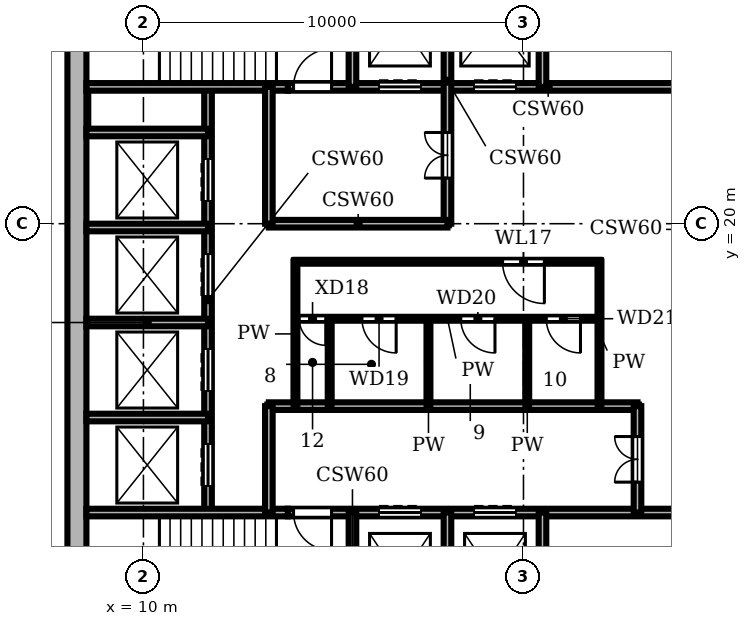
"""IFC4 building model, lengths in metres.
Left out: names, types, materials, properties, quantities, classifications, styles, units other than length and angle.
Written with IfcOpenShell. Run it as: python <this file> out.ifc"""

import sys

from ifc_helpers import new_model, si_unit, direction, frame, frame_2d, origin, place, context, subcontext, project, spatial, rectangle, extrude, element, fill, save


model = new_model("IFC4")
c1 = context("Model", 3, precision=1e-05, world=origin(), true_north=direction((0.0, 1.0)))
c2 = subcontext(c1, "Body", "Model", "MODEL_VIEW")
j1 = project(units=[si_unit("LENGTHUNIT", "METRE"), si_unit("PLANEANGLEUNIT", "RADIAN")], contexts=[c1])
p1 = place(None, origin())
s1 = spatial("IfcSite", under=j1, at=p1, CompositionType="ELEMENT")
p2 = place(p1, origin())
s2 = spatial("IfcBuilding", under=s1, at=p2, CompositionType="ELEMENT")
p3 = place(p2, frame((0.0, 0.0, 263.1)))
s3 = spatial("IfcBuildingStorey", under=s2, at=p3, CompositionType="ELEMENT", Elevation=263.1)
p4 = place(p3, frame((8.25, 27.5, 0.0), z_axis=(0.0, 0.0, 1.0), x_axis=(0.0, -1.0, 0.0)))
e1 = element("IfcWall", 1, at=p4, inside=s3, PredefinedType="SHEAR", context=c2, shape_type="SweptSolid", body=[
    extrude(rectangle(XDim=19.0, YDim=0.5, at=frame_2d((9.5, 0.0))), origin(), (0.0, 0.0, 1.0), 3.9),
])
p5 = place(p3, frame((8.5, 12.4, 0.0), z_axis=(0.0, 0.0, 1.0), x_axis=(1.0, 0.0, 0.0)))
e2 = element("IfcWall", 2, at=p5, inside=s3, PredefinedType="SHEAR", context=c2, shape_type="SweptSolid", body=[
    extrude(rectangle(XDim=5.3, YDim=0.2, at=frame_2d((2.65, 0.0))), origin(), (0.0, 0.0, 1.0), 3.58),
])
p6 = place(p3, frame((13.8, 12.4, 0.0), z_axis=(0.0, 0.0, 1.0), x_axis=(1.0, 0.0, 0.0)))
e3 = element("IfcWall", 3, at=p6, inside=s3, PredefinedType="SHEAR", context=c2, shape_type="SweptSolid", body=[
    extrude(rectangle(XDim=13.7, YDim=0.2, at=frame_2d((6.85, 0.0))), origin(), (0.0, 0.0, 1.0), 3.58),
])
p7 = place(p6, frame((2.4, 0.0, 0.0)))
e4 = element("IfcOpeningElement", 4, at=p7, cuts=e3, PredefinedType="OPENING", context=c2, shape_type="SweptSolid", body=[
    extrude(rectangle(XDim=1.1, YDim=2.1, at=frame_2d((0.55, 1.05))), frame((0.0, 0.11, 0.0), z_axis=(0.0, -1.0, 0.0), x_axis=(1.0, 0.0, 0.0)), (0.0, 0.0, 1.0), 0.22),
])
p8 = place(p6, frame((4.9, 0.0, 0.0)))
e5 = element("IfcOpeningElement", 5, at=p8, cuts=e3, PredefinedType="OPENING", context=c2, shape_type="SweptSolid", body=[
    extrude(rectangle(XDim=1.1, YDim=2.1, at=frame_2d((0.55, 1.05))), frame((0.0, 0.11, 0.0), z_axis=(0.0, -1.0, 0.0), x_axis=(1.0, 0.0, 0.0)), (0.0, 0.0, 1.0), 0.22),
])
p9 = place(p6, frame((0.15, 0.0, 0.0)))
e6 = element("IfcOpeningElement", 6, at=p9, cuts=e3, PredefinedType="OPENING", context=c2, shape_type="SweptSolid", body=[
    extrude(rectangle(XDim=1.0, YDim=2.1, at=frame_2d((0.5, 1.05))), frame((0.0, 0.11, 0.0), z_axis=(0.0, -1.0, 0.0), x_axis=(1.0, 0.0, 0.0)), (0.0, 0.0, 1.0), 0.22),
])
p10 = place(p3, frame((8.5, 14.9, 0.0), z_axis=(0.0, 0.0, 1.0), x_axis=(1.0, 0.0, 0.0)))
e7 = element("IfcWall", 7, at=p10, inside=s3, PredefinedType="SHEAR", context=c2, shape_type="SweptSolid", body=[
    extrude(rectangle(XDim=3.2, YDim=0.2, at=frame_2d((1.6, 0.0))), origin(), (0.0, 0.0, 1.0), 3.58),
])
p11 = place(p3, frame((13.3, 15.2, 0.0), z_axis=(0.0, 0.0, 1.0), x_axis=(1.0, 0.0, 0.0)))
e8 = element("IfcWall", 8, at=p11, inside=s3, PredefinedType="SHEAR", context=c2, shape_type="SweptSolid", body=[
    extrude(rectangle(XDim=9.7, YDim=0.2, at=frame_2d((4.85, 0.0))), origin(), (0.0, 0.0, 1.0), 3.58),
])
p12 = place(p3, frame((8.5, 17.4, 0.0), z_axis=(0.0, 0.0, 1.0), x_axis=(1.0, 0.0, 0.0)))
e9 = element("IfcWall", 9, at=p12, inside=s3, PredefinedType="SHEAR", context=c2, shape_type="SweptSolid", body=[
    extrude(rectangle(XDim=3.2, YDim=0.2, at=frame_2d((1.6, 0.0))), origin(), (0.0, 0.0, 1.0), 3.58),
])
p13 = place(p3, frame((14.0, 17.5, 0.0), z_axis=(0.0, 0.0, 1.0), x_axis=(1.0, 0.0, 0.0)))
e10 = element("IfcWall", 10, at=p13, inside=s3, PredefinedType="PARTITIONING", context=c2, shape_type="SweptSolid", body=[
    extrude(rectangle(XDim=8.0, YDim=0.1, at=frame_2d((4.0, 0.0))), origin(), (0.0, 0.0, 1.0), 3.58),
])
p14 = place(p13, frame((0.1, 0.0, 0.0)))
e11 = element("IfcOpeningElement", 11, at=p14, cuts=e10, PredefinedType="OPENING", context=c2, shape_type="SweptSolid", body=[
    extrude(rectangle(XDim=0.7, YDim=2.1, at=frame_2d((0.35, 1.05))), frame((0.0, 0.06, 0.0), z_axis=(0.0, -1.0, 0.0), x_axis=(1.0, 0.0, 0.0)), (0.0, 0.0, 1.0), 0.12),
])
p15 = place(p13, frame((1.75, 0.0, 0.0)))
e12 = element("IfcOpeningElement", 12, at=p15, cuts=e10, PredefinedType="OPENING", context=c2, shape_type="SweptSolid", body=[
    extrude(rectangle(XDim=0.9, YDim=2.1, at=frame_2d((0.45, 1.05))), frame((0.0, 0.06, 0.0), z_axis=(0.0, -1.0, 0.0), x_axis=(1.0, 0.0, 0.0)), (0.0, 0.0, 1.0), 0.12),
])
p16 = place(p13, frame((4.35, 0.0, 0.0)))
e13 = element("IfcOpeningElement", 13, at=p16, cuts=e10, PredefinedType="OPENING", context=c2, shape_type="SweptSolid", body=[
    extrude(rectangle(XDim=0.9, YDim=2.1, at=frame_2d((0.45, 1.05))), frame((0.0, 0.06, 0.0), z_axis=(0.0, -1.0, 0.0), x_axis=(1.0, 0.0, 0.0)), (0.0, 0.0, 1.0), 0.12),
])
p17 = place(p13, frame((6.6, 0.0, 0.0)))
e14 = element("IfcOpeningElement", 14, at=p17, cuts=e10, PredefinedType="OPENING", context=c2, shape_type="SweptSolid", body=[
    extrude(rectangle(XDim=0.9, YDim=2.1, at=frame_2d((0.45, 1.05))), frame((0.0, 0.06, 0.0), z_axis=(0.0, -1.0, 0.0), x_axis=(1.0, 0.0, 0.0)), (0.0, 0.0, 1.0), 0.12),
])
p18 = place(p3, frame((14.0, 19.0, 0.0), z_axis=(0.0, 0.0, 1.0), x_axis=(1.0, 0.0, 0.0)))
e15 = element("IfcWall", 15, at=p18, inside=s3, PredefinedType="PARTITIONING", context=c2, shape_type="SweptSolid", body=[
    extrude(rectangle(XDim=8.0, YDim=0.1, at=frame_2d((4.0, 0.0))), origin(), (0.0, 0.0, 1.0), 3.58),
])
p19 = place(p18, frame((5.45, 0.0, 0.0)))
e16 = element("IfcOpeningElement", 16, at=p19, cuts=e15, PredefinedType="OPENING", context=c2, shape_type="SweptSolid", body=[
    extrude(rectangle(XDim=1.1, YDim=2.1, at=frame_2d((0.55, 1.05))), frame((0.0, 0.06, 0.0), z_axis=(0.0, -1.0, 0.0), x_axis=(1.0, 0.0, 0.0)), (0.0, 0.0, 1.0), 0.12),
])
p20 = place(p3, frame((8.5, 19.9, 0.0), z_axis=(0.0, 0.0, 1.0), x_axis=(1.0, 0.0, 0.0)))
e17 = element("IfcWall", 17, at=p20, inside=s3, PredefinedType="SHEAR", context=c2, shape_type="SweptSolid", body=[
    extrude(rectangle(XDim=3.2, YDim=0.2, at=frame_2d((1.6, 0.0))), origin(), (0.0, 0.0, 1.0), 3.58),
])
p21 = place(p3, frame((13.3, 20.0, 0.0), z_axis=(0.0, 0.0, 1.0), x_axis=(1.0, 0.0, 0.0)))
e18 = element("IfcWall", 18, at=p21, inside=s3, PredefinedType="SHEAR", context=c2, shape_type="SweptSolid", body=[
    extrude(rectangle(XDim=4.7, YDim=0.2, at=frame_2d((2.35, 0.0))), origin(), (0.0, 0.0, 1.0), 3.58),
])
p22 = place(p3, frame((8.5, 22.4, 0.0), z_axis=(0.0, 0.0, 1.0), x_axis=(1.0, 0.0, 0.0)))
e19 = element("IfcWall", 19, at=p22, inside=s3, PredefinedType="SHEAR", context=c2, shape_type="SweptSolid", body=[
    extrude(rectangle(XDim=3.2, YDim=0.2, at=frame_2d((1.6, 0.0))), origin(), (0.0, 0.0, 1.0), 3.58),
])
p23 = place(p3, frame((8.5, 23.6, 0.0), z_axis=(0.0, 0.0, 1.0), x_axis=(1.0, 0.0, 0.0)))
e20 = element("IfcWall", 20, at=p23, inside=s3, PredefinedType="SHEAR", context=c2, shape_type="SweptSolid", body=[
    extrude(rectangle(XDim=5.3, YDim=0.2, at=frame_2d((2.65, 0.0))), origin(), (0.0, 0.0, 1.0), 3.58),
])
p24 = place(p3, frame((13.8, 23.6, 0.0), z_axis=(0.0, 0.0, 1.0), x_axis=(1.0, 0.0, 0.0)))
e21 = element("IfcWall", 21, at=p24, inside=s3, PredefinedType="SHEAR", context=c2, shape_type="SweptSolid", body=[
    extrude(rectangle(XDim=13.7, YDim=0.2, at=frame_2d((6.85, 0.0))), origin(), (0.0, 0.0, 1.0), 3.58),
])
p25 = place(p24, frame((2.4, 0.0, 0.0)))
e22 = element("IfcOpeningElement", 22, at=p25, cuts=e21, PredefinedType="OPENING", context=c2, shape_type="SweptSolid", body=[
    extrude(rectangle(XDim=1.1, YDim=2.1, at=frame_2d((0.55, 1.05))), frame((0.0, 0.11, 0.0), z_axis=(0.0, -1.0, 0.0), x_axis=(1.0, 0.0, 0.0)), (0.0, 0.0, 1.0), 0.22),
])
p26 = place(p24, frame((4.9, 0.0, 0.0)))
e23 = element("IfcOpeningElement", 23, at=p26, cuts=e21, PredefinedType="OPENING", context=c2, shape_type="SweptSolid", body=[
    extrude(rectangle(XDim=1.1, YDim=2.1, at=frame_2d((0.55, 1.05))), frame((0.0, 0.11, 0.0), z_axis=(0.0, -1.0, 0.0), x_axis=(1.0, 0.0, 0.0)), (0.0, 0.0, 1.0), 0.22),
])
p27 = place(p24, frame((0.15, 0.0, 0.0)))
e24 = element("IfcOpeningElement", 24, at=p27, cuts=e21, PredefinedType="OPENING", context=c2, shape_type="SweptSolid", body=[
    extrude(rectangle(XDim=1.0, YDim=2.1, at=frame_2d((0.5, 1.05))), frame((0.0, 0.11, 0.0), z_axis=(0.0, -1.0, 0.0), x_axis=(1.0, 0.0, 0.0)), (0.0, 0.0, 1.0), 0.22),
])
p28 = place(p3, frame((11.7, 12.4, 0.0), z_axis=(0.0, 0.0, 1.0), x_axis=(0.0, 1.0, 0.0)))
e25 = element("IfcWall", 25, at=p28, inside=s3, PredefinedType="SHEAR", context=c2, shape_type="SweptSolid", body=[
    extrude(rectangle(XDim=11.2, YDim=0.2, at=frame_2d((5.6, 0.0))), origin(), (0.0, 0.0, 1.0), 3.58),
])
p29 = place(p28, frame((0.7, 0.0, 0.0)))
e26 = element("IfcOpeningElement", 26, at=p29, cuts=e25, PredefinedType="OPENING", context=c2, shape_type="SweptSolid", body=[
    extrude(rectangle(XDim=1.1, YDim=2.1, at=frame_2d((0.55, 1.05))), frame((0.0, 0.11, 0.0), z_axis=(0.0, -1.0, 0.0), x_axis=(1.0, 0.0, 0.0)), (0.0, 0.0, 1.0), 0.22),
])
p30 = place(p28, frame((3.2, 0.0, 0.0)))
e27 = element("IfcOpeningElement", 27, at=p30, cuts=e25, PredefinedType="OPENING", context=c2, shape_type="SweptSolid", body=[
    extrude(rectangle(XDim=1.1, YDim=2.1, at=frame_2d((0.55, 1.05))), frame((0.0, 0.11, 0.0), z_axis=(0.0, -1.0, 0.0), x_axis=(1.0, 0.0, 0.0)), (0.0, 0.0, 1.0), 0.22),
])
p31 = place(p28, frame((5.7, 0.0, 0.0)))
e28 = element("IfcOpeningElement", 28, at=p31, cuts=e25, PredefinedType="OPENING", context=c2, shape_type="SweptSolid", body=[
    extrude(rectangle(XDim=1.1, YDim=2.1, at=frame_2d((0.55, 1.05))), frame((0.0, 0.11, 0.0), z_axis=(0.0, -1.0, 0.0), x_axis=(1.0, 0.0, 0.0)), (0.0, 0.0, 1.0), 0.22),
])
p32 = place(p28, frame((8.2, 0.0, 0.0)))
e29 = element("IfcOpeningElement", 29, at=p32, cuts=e25, PredefinedType="OPENING", context=c2, shape_type="SweptSolid", body=[
    extrude(rectangle(XDim=1.1, YDim=2.1, at=frame_2d((0.55, 1.05))), frame((0.0, 0.11, 0.0), z_axis=(0.0, -1.0, 0.0), x_axis=(1.0, 0.0, 0.0)), (0.0, 0.0, 1.0), 0.22),
])
p33 = place(p3, frame((13.3, 12.4, 0.0), z_axis=(0.0, 0.0, 1.0), x_axis=(0.0, 1.0, 0.0)))
e30 = element("IfcWall", 30, at=p33, inside=s3, PredefinedType="SHEAR", context=c2, shape_type="SweptSolid", body=[
    extrude(rectangle(XDim=2.8, YDim=0.2, at=frame_2d((1.4, 0.0))), origin(), (0.0, 0.0, 1.0), 3.58),
])
p34 = place(p3, frame((13.3, 20.0, 0.0), z_axis=(0.0, 0.0, 1.0), x_axis=(0.0, 1.0, 0.0)))
e31 = element("IfcWall", 31, at=p34, inside=s3, PredefinedType="SHEAR", context=c2, shape_type="SweptSolid", body=[
    extrude(rectangle(XDim=3.6, YDim=0.2, at=frame_2d((1.8, 0.0))), origin(), (0.0, 0.0, 1.0), 3.58),
])
p35 = place(p3, frame((14.0, 15.2, 0.0), z_axis=(0.0, 0.0, 1.0), x_axis=(0.0, 1.0, 0.0)))
e32 = element("IfcWall", 32, at=p35, inside=s3, PredefinedType="PARTITIONING", context=c2, shape_type="SweptSolid", body=[
    extrude(rectangle(XDim=3.8, YDim=0.1, at=frame_2d((1.9, 0.0))), origin(), (0.0, 0.0, 1.0), 3.58),
])
p36 = place(p3, frame((14.9, 15.2, 0.0), z_axis=(0.0, 0.0, 1.0), x_axis=(0.0, 1.0, 0.0)))
e33 = element("IfcWall", 33, at=p36, inside=s3, PredefinedType="PARTITIONING", context=c2, shape_type="SweptSolid", body=[
    extrude(rectangle(XDim=2.3, YDim=0.1, at=frame_2d((1.15, 0.0))), origin(), (0.0, 0.0, 1.0), 3.58),
])
for number, where, z_axis, x_axis in (
    (34, (15.5, 8.5, 0.0), (0.0, 0.0, 1.0), (0.0, 1.0, 0.0)),
    (35, (15.5, 23.6, 0.0), (0.0, 0.0, 1.0), (0.0, 1.0, 0.0)),
):
    element("IfcWall", number, at=place(p3, frame(where, z_axis=z_axis, x_axis=x_axis)), inside=s3, PredefinedType="SHEAR", context=c2, shape_type="SweptSolid", body=[
        extrude(rectangle(XDim=3.9, YDim=0.2, at=frame_2d((1.95, 0.0))), origin(), (0.0, 0.0, 1.0), 3.58),
    ])
p37 = place(p3, frame((17.5, 15.2, 0.0), z_axis=(0.0, 0.0, 1.0), x_axis=(0.0, 1.0, 0.0)))
e36 = element("IfcWall", 36, at=p37, inside=s3, PredefinedType="PARTITIONING", context=c2, shape_type="SweptSolid", body=[
    extrude(rectangle(XDim=2.3, YDim=0.1, at=frame_2d((1.15, 0.0))), origin(), (0.0, 0.0, 1.0), 3.58),
])
p38 = place(p3, frame((18.0, 8.5, 0.0), z_axis=(0.0, 0.0, 1.0), x_axis=(0.0, 1.0, 0.0)))
e37 = element("IfcWall", 37, at=p38, inside=s3, PredefinedType="SHEAR", context=c2, shape_type="SweptSolid", body=[
    extrude(rectangle(XDim=3.9, YDim=0.2, at=frame_2d((1.95, 0.0))), origin(), (0.0, 0.0, 1.0), 3.58),
])
p39 = place(p3, frame((18.0, 20.0, 0.0), z_axis=(0.0, 0.0, 1.0), x_axis=(0.0, 1.0, 0.0)))
e38 = element("IfcWall", 38, at=p39, inside=s3, PredefinedType="SHEAR", context=c2, shape_type="SweptSolid", body=[
    extrude(rectangle(XDim=7.5, YDim=0.2, at=frame_2d((3.75, 0.0))), origin(), (0.0, 0.0, 1.0), 3.58),
])
p40 = place(p39, frame((1.2, 0.0, 0.0)))
e39 = element("IfcOpeningElement", 39, at=p40, cuts=e38, PredefinedType="OPENING", context=c2, shape_type="SweptSolid", body=[
    extrude(rectangle(XDim=1.2, YDim=2.1, at=frame_2d((0.6, 1.05))), frame((0.0, 0.11, 0.0), z_axis=(0.0, -1.0, 0.0), x_axis=(1.0, 0.0, 0.0)), (0.0, 0.0, 1.0), 0.22),
])
p41 = place(p3, frame((20.1, 15.2, 0.0), z_axis=(0.0, 0.0, 1.0), x_axis=(0.0, 1.0, 0.0)))
e40 = element("IfcWall", 40, at=p41, inside=s3, PredefinedType="PARTITIONING", context=c2, shape_type="SweptSolid", body=[
    extrude(rectangle(XDim=2.3, YDim=0.1, at=frame_2d((1.15, 0.0))), origin(), (0.0, 0.0, 1.0), 3.58),
])
for number, where, z_axis, x_axis in (
    (41, (20.5, 8.5, 0.0), (0.0, 0.0, 1.0), (0.0, 1.0, 0.0)),
    (42, (20.5, 23.6, 0.0), (0.0, 0.0, 1.0), (0.0, 1.0, 0.0)),
):
    element("IfcWall", number, at=place(p3, frame(where, z_axis=z_axis, x_axis=x_axis)), inside=s3, PredefinedType="SHEAR", context=c2, shape_type="SweptSolid", body=[
        extrude(rectangle(XDim=3.9, YDim=0.2, at=frame_2d((1.95, 0.0))), origin(), (0.0, 0.0, 1.0), 3.58),
    ])
p42 = place(p3, frame((22.0, 15.2, 0.0), z_axis=(0.0, 0.0, 1.0), x_axis=(0.0, 1.0, 0.0)))
e43 = element("IfcWall", 43, at=p42, inside=s3, PredefinedType="PARTITIONING", context=c2, shape_type="SweptSolid", body=[
    extrude(rectangle(XDim=3.8, YDim=0.1, at=frame_2d((1.9, 0.0))), origin(), (0.0, 0.0, 1.0), 3.58),
])
p43 = place(p3, frame((23.0, 12.4, 0.0), z_axis=(0.0, 0.0, 1.0), x_axis=(0.0, 1.0, 0.0)))
e44 = element("IfcWall", 44, at=p43, inside=s3, PredefinedType="SHEAR", context=c2, shape_type="SweptSolid", body=[
    extrude(rectangle(XDim=2.8, YDim=0.2, at=frame_2d((1.4, 0.0))), origin(), (0.0, 0.0, 1.0), 3.58),
])
p44 = place(p43, frame((0.8, 0.0, 0.0)))
e45 = element("IfcOpeningElement", 45, at=p44, cuts=e44, PredefinedType="OPENING", context=c2, shape_type="SweptSolid", body=[
    extrude(rectangle(XDim=1.2, YDim=2.1, at=frame_2d((0.6, 1.05))), frame((0.0, 0.11, 0.0), z_axis=(0.0, -1.0, 0.0), x_axis=(1.0, 0.0, 0.0)), (0.0, 0.0, 1.0), 0.22),
])
p45 = place(p29, origin())
e46 = element("IfcDoor", 46, at=p45, inside=s3, OperationType="DOUBLE_DOOR_SLIDING", PredefinedType="DOOR", context=c2, shape_type="SweptSolid", body=[
    extrude(rectangle(XDim=1.1, YDim=2.1, at=frame_2d((0.55, 1.05))), frame((0.0, 0.025, 0.0), z_axis=(0.0, -1.0, 0.0), x_axis=(1.0, 0.0, 0.0)), (0.0, 0.0, 1.0), 0.05),
])
fill(e26, e46)
p46 = place(p30, origin())
e47 = element("IfcDoor", 47, at=p46, inside=s3, OperationType="DOUBLE_DOOR_SLIDING", PredefinedType="DOOR", context=c2, shape_type="SweptSolid", body=[
    extrude(rectangle(XDim=1.1, YDim=2.1, at=frame_2d((0.55, 1.05))), frame((0.0, 0.025, 0.0), z_axis=(0.0, -1.0, 0.0), x_axis=(1.0, 0.0, 0.0)), (0.0, 0.0, 1.0), 0.05),
])
fill(e27, e47)
p47 = place(p31, origin())
e48 = element("IfcDoor", 48, at=p47, inside=s3, OperationType="DOUBLE_DOOR_SLIDING", PredefinedType="DOOR", context=c2, shape_type="SweptSolid", body=[
    extrude(rectangle(XDim=1.1, YDim=2.1, at=frame_2d((0.55, 1.05))), frame((0.0, 0.025, 0.0), z_axis=(0.0, -1.0, 0.0), x_axis=(1.0, 0.0, 0.0)), (0.0, 0.0, 1.0), 0.05),
])
fill(e28, e48)
p48 = place(p32, origin())
e49 = element("IfcDoor", 49, at=p48, inside=s3, OperationType="DOUBLE_DOOR_SLIDING", PredefinedType="DOOR", context=c2, shape_type="SweptSolid", body=[
    extrude(rectangle(XDim=1.1, YDim=2.1, at=frame_2d((0.55, 1.05))), frame((0.0, 0.025, 0.0), z_axis=(0.0, -1.0, 0.0), x_axis=(1.0, 0.0, 0.0)), (0.0, 0.0, 1.0), 0.05),
])
fill(e29, e49)
p49 = place(p7, origin())
e50 = element("IfcDoor", 50, at=p49, inside=s3, OperationType="DOUBLE_DOOR_SLIDING", PredefinedType="DOOR", context=c2, shape_type="SweptSolid", body=[
    extrude(rectangle(XDim=1.1, YDim=2.1, at=frame_2d((0.55, 1.05))), frame((0.0, 0.025, 0.0), z_axis=(0.0, -1.0, 0.0), x_axis=(1.0, 0.0, 0.0)), (0.0, 0.0, 1.0), 0.05),
])
fill(e4, e50)
p50 = place(p8, origin())
e51 = element("IfcDoor", 51, at=p50, inside=s3, OperationType="DOUBLE_DOOR_SLIDING", PredefinedType="DOOR", context=c2, shape_type="SweptSolid", body=[
    extrude(rectangle(XDim=1.1, YDim=2.1, at=frame_2d((0.55, 1.05))), frame((0.0, 0.025, 0.0), z_axis=(0.0, -1.0, 0.0), x_axis=(1.0, 0.0, 0.0)), (0.0, 0.0, 1.0), 0.05),
])
fill(e5, e51)
p51 = place(p25, origin())
e52 = element("IfcDoor", 52, at=p51, inside=s3, OperationType="DOUBLE_DOOR_SLIDING", PredefinedType="DOOR", context=c2, shape_type="SweptSolid", body=[
    extrude(rectangle(XDim=1.1, YDim=2.1, at=frame_2d((0.55, 1.05))), frame((0.0, 0.025, 0.0), z_axis=(0.0, -1.0, 0.0), x_axis=(1.0, 0.0, 0.0)), (0.0, 0.0, 1.0), 0.05),
])
fill(e22, e52)
p52 = place(p26, origin())
e53 = element("IfcDoor", 53, at=p52, inside=s3, OperationType="DOUBLE_DOOR_SLIDING", PredefinedType="DOOR", context=c2, shape_type="SweptSolid", body=[
    extrude(rectangle(XDim=1.1, YDim=2.1, at=frame_2d((0.55, 1.05))), frame((0.0, 0.025, 0.0), z_axis=(0.0, -1.0, 0.0), x_axis=(1.0, 0.0, 0.0)), (0.0, 0.0, 1.0), 0.05),
])
fill(e23, e53)
p53 = place(p9, frame((1.0, 0.0, 0.0), z_axis=(0.0, 0.0, 1.0), x_axis=(-1.0, 0.0, 0.0)))
e54 = element("IfcDoor", 54, at=p53, inside=s3, OperationType="SINGLE_SWING_LEFT", PredefinedType="DOOR", context=c2, shape_type="SweptSolid", body=[
    extrude(rectangle(XDim=1.0, YDim=2.1, at=frame_2d((0.5, 1.05))), frame((0.0, 0.025, 0.0), z_axis=(0.0, -1.0, 0.0), x_axis=(1.0, 0.0, 0.0)), (0.0, 0.0, 1.0), 0.05),
])
fill(e6, e54)
p54 = place(p27, origin())
e55 = element("IfcDoor", 55, at=p54, inside=s3, OperationType="SINGLE_SWING_RIGHT", PredefinedType="DOOR", context=c2, shape_type="SweptSolid", body=[
    extrude(rectangle(XDim=1.0, YDim=2.1, at=frame_2d((0.5, 1.05))), frame((0.0, 0.025, 0.0), z_axis=(0.0, -1.0, 0.0), x_axis=(1.0, 0.0, 0.0)), (0.0, 0.0, 1.0), 0.05),
])
fill(e24, e55)
p55 = place(p44, origin())
e56 = element("IfcDoor", 56, at=p55, inside=s3, OperationType="DOUBLE_DOOR_SINGLE_SWING", PredefinedType="DOOR", context=c2, shape_type="SweptSolid", body=[
    extrude(rectangle(XDim=1.2, YDim=2.1, at=frame_2d((0.6, 1.05))), frame((0.0, 0.025, 0.0), z_axis=(0.0, -1.0, 0.0), x_axis=(1.0, 0.0, 0.0)), (0.0, 0.0, 1.0), 0.05),
])
fill(e45, e56)
p56 = place(p40, origin())
e57 = element("IfcDoor", 57, at=p56, inside=s3, OperationType="DOUBLE_DOOR_SINGLE_SWING", PredefinedType="DOOR", context=c2, shape_type="SweptSolid", body=[
    extrude(rectangle(XDim=1.2, YDim=2.1, at=frame_2d((0.6, 1.05))), frame((0.0, 0.025, 0.0), z_axis=(0.0, -1.0, 0.0), x_axis=(1.0, 0.0, 0.0)), (0.0, 0.0, 1.0), 0.05),
])
fill(e39, e57)
p57 = place(p19, frame((1.1, 0.0, 0.0), z_axis=(0.0, 0.0, 1.0), x_axis=(-1.0, 0.0, 0.0)))
e58 = element("IfcDoor", 58, at=p57, inside=s3, OperationType="SINGLE_SWING_LEFT", PredefinedType="DOOR", context=c2, shape_type="SweptSolid", body=[
    extrude(rectangle(XDim=1.1, YDim=2.1, at=frame_2d((0.55, 1.05))), frame((0.0, 0.025, 0.0), z_axis=(0.0, -1.0, 0.0), x_axis=(1.0, 0.0, 0.0)), (0.0, 0.0, 1.0), 0.05),
])
fill(e16, e58)
p58 = place(p14, frame((0.7, 0.0, 0.0), z_axis=(0.0, 0.0, 1.0), x_axis=(-1.0, 0.0, 0.0)))
e59 = element("IfcDoor", 59, at=p58, inside=s3, OperationType="SINGLE_SWING_LEFT", PredefinedType="DOOR", context=c2, shape_type="SweptSolid", body=[
    extrude(rectangle(XDim=0.7, YDim=2.1, at=frame_2d((0.35, 1.05))), frame((0.0, 0.025, 0.0), z_axis=(0.0, -1.0, 0.0), x_axis=(1.0, 0.0, 0.0)), (0.0, 0.0, 1.0), 0.05),
])
fill(e11, e59)
p59 = place(p15, frame((0.9, 0.0, 0.0), z_axis=(0.0, 0.0, 1.0), x_axis=(-1.0, 0.0, 0.0)))
e60 = element("IfcDoor", 60, at=p59, inside=s3, OperationType="SINGLE_SWING_LEFT", PredefinedType="DOOR", context=c2, shape_type="SweptSolid", body=[
    extrude(rectangle(XDim=0.9, YDim=2.1, at=frame_2d((0.45, 1.05))), frame((0.0, 0.025, 0.0), z_axis=(0.0, -1.0, 0.0), x_axis=(1.0, 0.0, 0.0)), (0.0, 0.0, 1.0), 0.05),
])
fill(e12, e60)
p60 = place(p16, frame((0.9, 0.0, 0.0), z_axis=(0.0, 0.0, 1.0), x_axis=(-1.0, 0.0, 0.0)))
e61 = element("IfcDoor", 61, at=p60, inside=s3, OperationType="SINGLE_SWING_LEFT", PredefinedType="DOOR", context=c2, shape_type="SweptSolid", body=[
    extrude(rectangle(XDim=0.9, YDim=2.1, at=frame_2d((0.45, 1.05))), frame((0.0, 0.025, 0.0), z_axis=(0.0, -1.0, 0.0), x_axis=(1.0, 0.0, 0.0)), (0.0, 0.0, 1.0), 0.05),
])
fill(e13, e61)
p61 = place(p17, frame((0.9, 0.0, 0.0), z_axis=(0.0, 0.0, 1.0), x_axis=(-1.0, 0.0, 0.0)))
e62 = element("IfcDoor", 62, at=p61, inside=s3, OperationType="SINGLE_SWING_LEFT", PredefinedType="DOOR", context=c2, shape_type="SweptSolid", body=[
    extrude(rectangle(XDim=0.9, YDim=2.1, at=frame_2d((0.45, 1.05))), frame((0.0, 0.025, 0.0), z_axis=(0.0, -1.0, 0.0), x_axis=(1.0, 0.0, 0.0)), (0.0, 0.0, 1.0), 0.05),
])
fill(e14, e62)
save(model, sys.argv[1])
